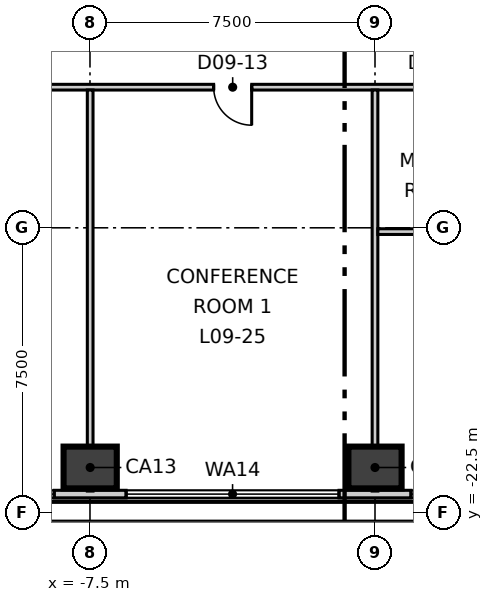
"""IFC4 building model, lengths in metres.
Left out: names, types, materials, properties, quantities, classifications, styles, units other than length and angle.
Written with IfcOpenShell. Run it as: python <this file> out.ifc"""

import sys

from ifc_helpers import new_model, si_unit, direction, frame, frame_2d, origin, origin_2d, place, context, subcontext, project, spatial, rectangle, extrude, element, fill, save


model = new_model("IFC4")
c1 = context("Model", 3, precision=1e-05, world=origin(), true_north=direction((0.0, 1.0)))
c2 = subcontext(c1, "Body", "Model", "MODEL_VIEW")
j1 = project(units=[si_unit("LENGTHUNIT", "METRE"), si_unit("PLANEANGLEUNIT", "RADIAN")], contexts=[c1])
p1 = place(None, origin())
s1 = spatial("IfcSite", under=j1, at=p1, CompositionType="ELEMENT")
p2 = place(p1, origin())
s2 = spatial("IfcBuilding", under=s1, at=p2, CompositionType="ELEMENT")
p3 = place(p2, frame((0.0, 0.0, 47.3)))
s3 = spatial("IfcBuildingStorey", under=s2, at=p3, CompositionType="ELEMENT", Elevation=47.3)
for number, where, z_axis, x_axis in (
    (1, (-7.495, -21.307, -0.3), (0.0, 0.0, 1.0), (1.0, 0.0, 0.0)),
    (2, (0.0, -21.307, -0.3), (0.0, 0.0, 1.0), (1.0, 0.0, 0.0)),
):
    element("IfcColumn", number, at=place(p3, frame(where, z_axis=z_axis, x_axis=x_axis)), inside=s3, PredefinedType="COLUMN", context=c2, shape_type="SweptSolid", body=[
        extrude(rectangle(XDim=1.4, YDim=1.1, at=origin_2d()), origin(), (0.0, 0.0, 1.0), 4.0),
    ])
p4 = place(p3, frame((-3.417, 38.096, 0.0), z_axis=(0.0, 0.0, 1.0), x_axis=(-0.500000412988, -0.866025165346, 0.0)))
e3 = element("IfcWall", 3, at=p4, inside=s3, PredefinedType="ELEMENTEDWALL", context=c2, shape_type="SweptSolid", body=[
    extrude(rectangle(XDim=62.548, YDim=0.2, at=frame_2d((31.274, 0.0))), origin(), (0.0, 0.0, 1.0), 3.7),
])
p5 = place(p4, frame((2.25, 0.0, 0.9)))
e4 = element("IfcOpeningElement", 4, at=p5, cuts=e3, PredefinedType="OPENING", context=c2, shape_type="SweptSolid", body=[
    extrude(rectangle(XDim=5.6, YDim=2.5, at=frame_2d((2.8, 1.25))), frame((0.0, 0.11, 0.0), z_axis=(0.0, -1.0, 0.0), x_axis=(1.0, 0.0, 0.0)), (0.0, 0.0, 1.0), 0.22),
])
p6 = place(p4, frame((9.745, 0.0, 0.9)))
e5 = element("IfcOpeningElement", 5, at=p6, cuts=e3, PredefinedType="OPENING", context=c2, shape_type="SweptSolid", body=[
    extrude(rectangle(XDim=5.6, YDim=2.5, at=frame_2d((2.8, 1.25))), frame((0.0, 0.11, 0.0), z_axis=(0.0, -1.0, 0.0), x_axis=(1.0, 0.0, 0.0)), (0.0, 0.0, 1.0), 0.22),
])
p7 = place(p4, frame((17.241, 0.0, 0.9)))
e6 = element("IfcOpeningElement", 6, at=p7, cuts=e3, PredefinedType="OPENING", context=c2, shape_type="SweptSolid", body=[
    extrude(rectangle(XDim=5.6, YDim=2.5, at=frame_2d((2.8, 1.25))), frame((0.0, 0.11, 0.0), z_axis=(0.0, -1.0, 0.0), x_axis=(1.0, 0.0, 0.0)), (0.0, 0.0, 1.0), 0.22),
])
p8 = place(p4, frame((24.736, 0.0, 0.9)))
e7 = element("IfcOpeningElement", 7, at=p8, cuts=e3, PredefinedType="OPENING", context=c2, shape_type="SweptSolid", body=[
    extrude(rectangle(XDim=5.6, YDim=2.5, at=frame_2d((2.8, 1.25))), frame((0.0, 0.11, 0.0), z_axis=(0.0, -1.0, 0.0), x_axis=(1.0, 0.0, 0.0)), (0.0, 0.0, 1.0), 0.22),
])
p9 = place(p4, frame((32.231, 0.0, 0.9)))
e8 = element("IfcOpeningElement", 8, at=p9, cuts=e3, PredefinedType="OPENING", context=c2, shape_type="SweptSolid", body=[
    extrude(rectangle(XDim=5.6, YDim=2.5, at=frame_2d((2.8, 1.25))), frame((0.0, 0.11, 0.0), z_axis=(0.0, -1.0, 0.0), x_axis=(1.0, 0.0, 0.0)), (0.0, 0.0, 1.0), 0.22),
])
p10 = place(p4, frame((39.727, 0.0, 0.9)))
e9 = element("IfcOpeningElement", 9, at=p10, cuts=e3, PredefinedType="OPENING", context=c2, shape_type="SweptSolid", body=[
    extrude(rectangle(XDim=5.6, YDim=2.5, at=frame_2d((2.8, 1.25))), frame((0.0, 0.11, 0.0), z_axis=(0.0, -1.0, 0.0), x_axis=(1.0, 0.0, 0.0)), (0.0, 0.0, 1.0), 0.22),
])
p11 = place(p4, frame((47.222, 0.0, 0.9)))
e10 = element("IfcOpeningElement", 10, at=p11, cuts=e3, PredefinedType="OPENING", context=c2, shape_type="SweptSolid", body=[
    extrude(rectangle(XDim=5.6, YDim=2.5, at=frame_2d((2.8, 1.25))), frame((0.0, 0.11, 0.0), z_axis=(0.0, -1.0, 0.0), x_axis=(1.0, 0.0, 0.0)), (0.0, 0.0, 1.0), 0.22),
])
p12 = place(p4, frame((54.717, 0.0, 0.9)))
e11 = element("IfcOpeningElement", 11, at=p12, cuts=e3, PredefinedType="OPENING", context=c2, shape_type="SweptSolid", body=[
    extrude(rectangle(XDim=5.6, YDim=2.5, at=frame_2d((2.8, 1.25))), frame((0.0, 0.11, 0.0), z_axis=(0.0, -1.0, 0.0), x_axis=(1.0, 0.0, 0.0)), (0.0, 0.0, 1.0), 0.22),
])
p13 = place(p3, frame((-31.284, -22.007, 0.0), z_axis=(0.0, 0.0, 1.0), x_axis=(1.0, 0.0, 0.0)))
e12 = element("IfcWall", 12, at=p13, inside=s3, PredefinedType="ELEMENTEDWALL", context=c2, shape_type="SweptSolid", body=[
    extrude(rectangle(XDim=62.548, YDim=0.2, at=frame_2d((31.274, 0.0))), origin(), (0.0, 0.0, 1.0), 3.7),
])
p14 = place(p13, frame((2.251, 0.0, 0.9)))
e13 = element("IfcOpeningElement", 13, at=p14, cuts=e12, PredefinedType="OPENING", context=c2, shape_type="SweptSolid", body=[
    extrude(rectangle(XDim=5.6, YDim=2.5, at=frame_2d((2.8, 1.25))), frame((0.0, 0.11, 0.0), z_axis=(0.0, -1.0, 0.0), x_axis=(1.0, 0.0, 0.0)), (0.0, 0.0, 1.0), 0.22),
])
p15 = place(p13, frame((9.746, 0.0, 0.9)))
e14 = element("IfcOpeningElement", 14, at=p15, cuts=e12, PredefinedType="OPENING", context=c2, shape_type="SweptSolid", body=[
    extrude(rectangle(XDim=5.6, YDim=2.5, at=frame_2d((2.8, 1.25))), frame((0.0, 0.11, 0.0), z_axis=(0.0, -1.0, 0.0), x_axis=(1.0, 0.0, 0.0)), (0.0, 0.0, 1.0), 0.22),
])
p16 = place(p13, frame((17.241, 0.0, 0.9)))
e15 = element("IfcOpeningElement", 15, at=p16, cuts=e12, PredefinedType="OPENING", context=c2, shape_type="SweptSolid", body=[
    extrude(rectangle(XDim=5.6, YDim=2.5, at=frame_2d((2.8, 1.25))), frame((0.0, 0.11, 0.0), z_axis=(0.0, -1.0, 0.0), x_axis=(1.0, 0.0, 0.0)), (0.0, 0.0, 1.0), 0.22),
])
p17 = place(p13, frame((24.736, 0.0, 0.9)))
e16 = element("IfcOpeningElement", 16, at=p17, cuts=e12, PredefinedType="OPENING", context=c2, shape_type="SweptSolid", body=[
    extrude(rectangle(XDim=5.6, YDim=2.5, at=frame_2d((2.8, 1.25))), frame((0.0, 0.11, 0.0), z_axis=(0.0, -1.0, 0.0), x_axis=(1.0, 0.0, 0.0)), (0.0, 0.0, 1.0), 0.22),
])
p18 = place(p13, frame((32.232, 0.0, 0.9)))
e17 = element("IfcOpeningElement", 17, at=p18, cuts=e12, PredefinedType="OPENING", context=c2, shape_type="SweptSolid", body=[
    extrude(rectangle(XDim=5.6, YDim=2.5, at=frame_2d((2.8, 1.25))), frame((0.0, 0.11, 0.0), z_axis=(0.0, -1.0, 0.0), x_axis=(1.0, 0.0, 0.0)), (0.0, 0.0, 1.0), 0.22),
])
p19 = place(p13, frame((39.727, 0.0, 0.9)))
e18 = element("IfcOpeningElement", 18, at=p19, cuts=e12, PredefinedType="OPENING", context=c2, shape_type="SweptSolid", body=[
    extrude(rectangle(XDim=5.6, YDim=2.5, at=frame_2d((2.8, 1.25))), frame((0.0, 0.11, 0.0), z_axis=(0.0, -1.0, 0.0), x_axis=(1.0, 0.0, 0.0)), (0.0, 0.0, 1.0), 0.22),
])
p20 = place(p13, frame((47.222, 0.0, 0.9)))
e19 = element("IfcOpeningElement", 19, at=p20, cuts=e12, PredefinedType="OPENING", context=c2, shape_type="SweptSolid", body=[
    extrude(rectangle(XDim=5.6, YDim=2.5, at=frame_2d((2.8, 1.25))), frame((0.0, 0.11, 0.0), z_axis=(0.0, -1.0, 0.0), x_axis=(1.0, 0.0, 0.0)), (0.0, 0.0, 1.0), 0.22),
])
p21 = place(p13, frame((54.717, 0.0, 0.9)))
e20 = element("IfcOpeningElement", 20, at=p21, cuts=e12, PredefinedType="OPENING", context=c2, shape_type="SweptSolid", body=[
    extrude(rectangle(XDim=5.6, YDim=2.5, at=frame_2d((2.8, 1.25))), frame((0.0, 0.11, 0.0), z_axis=(0.0, -1.0, 0.0), x_axis=(1.0, 0.0, 0.0)), (0.0, 0.0, 1.0), 0.22),
])
p22 = place(p3, frame((-19.497, -11.17, 0.0), z_axis=(0.0, 0.0, 1.0), x_axis=(0.499998854553, 0.866026065108, 0.0)))
e21 = element("IfcWall", 21, at=p22, inside=s3, PredefinedType="PARTITIONING", context=c2, shape_type="SweptSolid", body=[
    extrude(rectangle(XDim=38.994, YDim=0.15, at=frame_2d((19.497, 0.0))), origin(), (0.0, 0.0, 1.0), 3.7),
])
p23 = place(p22, frame((36.144, 0.0, 0.0)))
e22 = element("IfcOpeningElement", 22, at=p23, cuts=e21, PredefinedType="OPENING", context=c2, shape_type="SweptSolid", body=[
    extrude(rectangle(XDim=1.1, YDim=2.1, at=frame_2d((0.55, 1.05))), frame((0.0, 0.085, 0.0), z_axis=(0.0, -1.0, 0.0), x_axis=(1.0, 0.0, 0.0)), (0.0, 0.0, 1.0), 0.17),
])
p24 = place(p22, frame((21.963, 0.0, 0.0)))
e23 = element("IfcOpeningElement", 23, at=p24, cuts=e21, PredefinedType="OPENING", context=c2, shape_type="SweptSolid", body=[
    extrude(rectangle(XDim=1.1, YDim=2.1, at=frame_2d((0.55, 1.05))), frame((0.0, 0.085, 0.0), z_axis=(0.0, -1.0, 0.0), x_axis=(1.0, 0.0, 0.0)), (0.0, 0.0, 1.0), 0.17),
])
p25 = place(p22, frame((32.363, 0.0, 0.0)))
e24 = element("IfcOpeningElement", 24, at=p25, cuts=e21, PredefinedType="OPENING", context=c2, shape_type="SweptSolid", body=[
    extrude(rectangle(XDim=0.9, YDim=2.1, at=frame_2d((0.45, 1.05))), frame((0.0, 0.085, 0.0), z_axis=(0.0, -1.0, 0.0), x_axis=(1.0, 0.0, 0.0)), (0.0, 0.0, 1.0), 0.17),
])
p26 = place(p22, frame((29.163, 0.0, 0.0)))
e25 = element("IfcOpeningElement", 25, at=p26, cuts=e21, PredefinedType="OPENING", context=c2, shape_type="SweptSolid", body=[
    extrude(rectangle(XDim=0.9, YDim=2.1, at=frame_2d((0.45, 1.05))), frame((0.0, 0.085, 0.0), z_axis=(0.0, -1.0, 0.0), x_axis=(1.0, 0.0, 0.0)), (0.0, 0.0, 1.0), 0.17),
])
p27 = place(p22, frame((26.263, 0.0, 0.0)))
e26 = element("IfcOpeningElement", 26, at=p27, cuts=e21, PredefinedType="OPENING", context=c2, shape_type="SweptSolid", body=[
    extrude(rectangle(XDim=1.0, YDim=2.1, at=frame_2d((0.5, 1.05))), frame((0.0, 0.085, 0.0), z_axis=(0.0, -1.0, 0.0), x_axis=(1.0, 0.0, 0.0)), (0.0, 0.0, 1.0), 0.17),
])
p28 = place(p22, frame((11.373, 0.0, 0.0)))
e27 = element("IfcOpeningElement", 27, at=p28, cuts=e21, PredefinedType="OPENING", context=c2, shape_type="SweptSolid", body=[
    extrude(rectangle(XDim=1.1, YDim=2.1, at=frame_2d((0.55, 1.05))), frame((0.0, 0.085, 0.0), z_axis=(0.0, -1.0, 0.0), x_axis=(1.0, 0.0, 0.0)), (0.0, 0.0, 1.0), 0.17),
])
p29 = place(p22, frame((1.581, 0.0, 0.0)))
e28 = element("IfcOpeningElement", 28, at=p29, cuts=e21, PredefinedType="OPENING", context=c2, shape_type="SweptSolid", body=[
    extrude(rectangle(XDim=1.1, YDim=2.1, at=frame_2d((0.55, 1.05))), frame((0.0, 0.085, 0.0), z_axis=(0.0, -1.0, 0.0), x_axis=(1.0, 0.0, 0.0)), (0.0, 0.0, 1.0), 0.17),
])
p30 = place(p3, frame((-19.422, -11.3, 0.0), z_axis=(0.0, 0.0, 1.0), x_axis=(1.0, 0.0, 0.0)))
e29 = element("IfcWall", 29, at=p30, inside=s3, PredefinedType="PARTITIONING", context=c2, shape_type="SweptSolid", body=[
    extrude(rectangle(XDim=38.994, YDim=0.15, at=frame_2d((19.497, 0.0))), origin(), (0.0, 0.0, 1.0), 3.7),
])
p31 = place(p30, frame((1.6, 0.0, 0.0)))
e30 = element("IfcOpeningElement", 30, at=p31, cuts=e29, PredefinedType="OPENING", context=c2, shape_type="SweptSolid", body=[
    extrude(rectangle(XDim=1.1, YDim=2.1, at=frame_2d((0.55, 1.05))), frame((0.0, 0.085, 0.0), z_axis=(0.0, -1.0, 0.0), x_axis=(1.0, 0.0, 0.0)), (0.0, 0.0, 1.0), 0.17),
])
p32 = place(p30, frame((7.682, 0.0, 0.0)))
e31 = element("IfcOpeningElement", 31, at=p32, cuts=e29, PredefinedType="OPENING", context=c2, shape_type="SweptSolid", body=[
    extrude(rectangle(XDim=1.0, YDim=2.1, at=frame_2d((0.5, 1.05))), frame((0.0, 0.085, 0.0), z_axis=(0.0, -1.0, 0.0), x_axis=(1.0, 0.0, 0.0)), (0.0, 0.0, 1.0), 0.17),
])
p33 = place(p30, frame((15.177, 0.0, 0.0)))
e32 = element("IfcOpeningElement", 32, at=p33, cuts=e29, PredefinedType="OPENING", context=c2, shape_type="SweptSolid", body=[
    extrude(rectangle(XDim=1.0, YDim=2.1, at=frame_2d((0.5, 1.05))), frame((0.0, 0.085, 0.0), z_axis=(0.0, -1.0, 0.0), x_axis=(1.0, 0.0, 0.0)), (0.0, 0.0, 1.0), 0.17),
])
p34 = place(p30, frame((29.372, 0.0, 0.0)))
e33 = element("IfcOpeningElement", 33, at=p34, cuts=e29, PredefinedType="OPENING", context=c2, shape_type="SweptSolid", body=[
    extrude(rectangle(XDim=1.1, YDim=2.1, at=frame_2d((0.55, 1.05))), frame((0.0, 0.085, 0.0), z_axis=(0.0, -1.0, 0.0), x_axis=(1.0, 0.0, 0.0)), (0.0, 0.0, 1.0), 0.17),
])
p35 = place(p30, frame((20.772, 0.0, 0.0)))
e34 = element("IfcOpeningElement", 34, at=p35, cuts=e29, PredefinedType="OPENING", context=c2, shape_type="SweptSolid", body=[
    extrude(rectangle(XDim=0.9, YDim=2.1, at=frame_2d((0.45, 1.05))), frame((0.0, 0.085, 0.0), z_axis=(0.0, -1.0, 0.0), x_axis=(1.0, 0.0, 0.0)), (0.0, 0.0, 1.0), 0.17),
])
p36 = place(p30, frame((23.772, 0.0, 0.0)))
e35 = element("IfcOpeningElement", 35, at=p36, cuts=e29, PredefinedType="OPENING", context=c2, shape_type="SweptSolid", body=[
    extrude(rectangle(XDim=0.9, YDim=2.1, at=frame_2d((0.45, 1.05))), frame((0.0, 0.085, 0.0), z_axis=(0.0, -1.0, 0.0), x_axis=(1.0, 0.0, 0.0)), (0.0, 0.0, 1.0), 0.17),
])
p37 = place(p30, frame((36.163, 0.0, 0.0)))
e36 = element("IfcOpeningElement", 36, at=p37, cuts=e29, PredefinedType="OPENING", context=c2, shape_type="SweptSolid", body=[
    extrude(rectangle(XDim=1.1, YDim=2.1, at=frame_2d((0.55, 1.05))), frame((0.0, 0.085, 0.0), z_axis=(0.0, -1.0, 0.0), x_axis=(1.0, 0.0, 0.0)), (0.0, 0.0, 1.0), 0.17),
])
p38 = place(p3, frame((-7.495, -21.927, 0.0), z_axis=(0.0, 0.0, 1.0), x_axis=(0.0, 1.0, 0.0)))
e37 = element("IfcWall", 37, at=p38, inside=s3, PredefinedType="PARTITIONING", context=c2, shape_type="SweptSolid", body=[
    extrude(rectangle(XDim=10.552, YDim=0.15, at=frame_2d((5.276, 0.0))), origin(), (0.0, 0.0, 1.0), 3.7),
])
p39 = place(p3, frame((0.0, -21.927, 0.0), z_axis=(0.0, 0.0, 1.0), x_axis=(0.0, 1.0, 0.0)))
e38 = element("IfcWall", 38, at=p39, inside=s3, PredefinedType="PARTITIONING", context=c2, shape_type="SweptSolid", body=[
    extrude(rectangle(XDim=10.552, YDim=0.15, at=frame_2d((5.276, 0.0))), origin(), (0.0, 0.0, 1.0), 3.2),
])
p40 = place(p3, frame((0.075, -15.1, 0.0), z_axis=(0.0, 0.0, 1.0), x_axis=(1.0, 0.0, 0.0)))
e39 = element("IfcWall", 39, at=p40, inside=s3, PredefinedType="PARTITIONING", context=c2, shape_type="SweptSolid", body=[
    extrude(rectangle(XDim=3.525, YDim=0.15, at=frame_2d((1.763, 0.0))), origin(), (0.0, 0.0, 1.0), 3.7),
])
p41 = place(p3, frame((0.075, 22.47, 0.0), z_axis=(0.0, 0.0, 1.0), x_axis=(0.500002280369, -0.866024087209, 0.0)))
e40 = element("IfcWall", 40, at=p41, inside=s3, PredefinedType="PARTITIONING", context=c2, shape_type="SweptSolid", body=[
    extrude(rectangle(XDim=38.844, YDim=0.15, at=frame_2d((19.422, 0.0))), origin(), (0.0, 0.0, 1.0), 3.7),
])
p42 = place(p41, frame((36.244, 0.0, 0.0)))
e41 = element("IfcOpeningElement", 41, at=p42, cuts=e40, PredefinedType="OPENING", context=c2, shape_type="SweptSolid", body=[
    extrude(rectangle(XDim=1.0, YDim=2.1, at=frame_2d((0.5, 1.05))), frame((0.0, 0.085, 0.0), z_axis=(0.0, -1.0, 0.0), x_axis=(1.0, 0.0, 0.0)), (0.0, 0.0, 1.0), 0.17),
])
p43 = place(p41, frame((21.963, 0.0, 0.0)))
e42 = element("IfcOpeningElement", 42, at=p43, cuts=e40, PredefinedType="OPENING", context=c2, shape_type="SweptSolid", body=[
    extrude(rectangle(XDim=1.1, YDim=2.1, at=frame_2d((0.55, 1.05))), frame((0.0, 0.085, 0.0), z_axis=(0.0, -1.0, 0.0), x_axis=(1.0, 0.0, 0.0)), (0.0, 0.0, 1.0), 0.17),
])
p44 = place(p41, frame((32.363, 0.0, 0.0)))
e43 = element("IfcOpeningElement", 43, at=p44, cuts=e40, PredefinedType="OPENING", context=c2, shape_type="SweptSolid", body=[
    extrude(rectangle(XDim=0.9, YDim=2.1, at=frame_2d((0.45, 1.05))), frame((0.0, 0.085, 0.0), z_axis=(0.0, -1.0, 0.0), x_axis=(1.0, 0.0, 0.0)), (0.0, 0.0, 1.0), 0.17),
])
p45 = place(p41, frame((29.163, 0.0, 0.0)))
e44 = element("IfcOpeningElement", 44, at=p45, cuts=e40, PredefinedType="OPENING", context=c2, shape_type="SweptSolid", body=[
    extrude(rectangle(XDim=0.9, YDim=2.1, at=frame_2d((0.45, 1.05))), frame((0.0, 0.085, 0.0), z_axis=(0.0, -1.0, 0.0), x_axis=(1.0, 0.0, 0.0)), (0.0, 0.0, 1.0), 0.17),
])
p46 = place(p41, frame((26.263, 0.0, 0.0)))
e45 = element("IfcOpeningElement", 45, at=p46, cuts=e40, PredefinedType="OPENING", context=c2, shape_type="SweptSolid", body=[
    extrude(rectangle(XDim=1.0, YDim=2.1, at=frame_2d((0.5, 1.05))), frame((0.0, 0.085, 0.0), z_axis=(0.0, -1.0, 0.0), x_axis=(1.0, 0.0, 0.0)), (0.0, 0.0, 1.0), 0.17),
])
p47 = place(p41, frame((9.071, 0.0, 0.0)))
e46 = element("IfcOpeningElement", 46, at=p47, cuts=e40, PredefinedType="OPENING", context=c2, shape_type="SweptSolid", body=[
    extrude(rectangle(XDim=1.1, YDim=2.1, at=frame_2d((0.55, 1.05))), frame((0.0, 0.085, 0.0), z_axis=(0.0, -1.0, 0.0), x_axis=(1.0, 0.0, 0.0)), (0.0, 0.0, 1.0), 0.17),
])
p48 = place(p16, origin())
e47 = element("IfcWindow", 47, at=p48, inside=s3, PartitioningType="SINGLE_PANEL", PredefinedType="WINDOW", context=c2, shape_type="SweptSolid", body=[
    extrude(rectangle(XDim=5.6, YDim=2.5, at=frame_2d((2.8, 1.25))), frame((0.0, 0.03, 0.0), z_axis=(0.0, -1.0, 0.0), x_axis=(1.0, 0.0, 0.0)), (0.0, 0.0, 1.0), 0.06),
])
fill(e15, e47)
p49 = place(p17, origin())
e48 = element("IfcWindow", 48, at=p49, inside=s3, PartitioningType="SINGLE_PANEL", PredefinedType="WINDOW", context=c2, shape_type="SweptSolid", body=[
    extrude(rectangle(XDim=5.6, YDim=2.5, at=frame_2d((2.8, 1.25))), frame((0.0, 0.03, 0.0), z_axis=(0.0, -1.0, 0.0), x_axis=(1.0, 0.0, 0.0)), (0.0, 0.0, 1.0), 0.06),
])
fill(e16, e48)
p50 = place(p18, origin())
e49 = element("IfcWindow", 49, at=p50, inside=s3, PartitioningType="SINGLE_PANEL", PredefinedType="WINDOW", context=c2, shape_type="SweptSolid", body=[
    extrude(rectangle(XDim=5.6, YDim=2.5, at=frame_2d((2.8, 1.25))), frame((0.0, 0.03, 0.0), z_axis=(0.0, -1.0, 0.0), x_axis=(1.0, 0.0, 0.0)), (0.0, 0.0, 1.0), 0.06),
])
fill(e17, e49)
p51 = place(p33, origin())
e50 = element("IfcDoor", 50, at=p51, inside=s3, OperationType="SINGLE_SWING_RIGHT", PredefinedType="DOOR", context=c2, shape_type="SweptSolid", body=[
    extrude(rectangle(XDim=1.0, YDim=2.1, at=frame_2d((0.5, 1.05))), frame((0.0, 0.025, 0.0), z_axis=(0.0, -1.0, 0.0), x_axis=(1.0, 0.0, 0.0)), (0.0, 0.0, 1.0), 0.05),
])
fill(e32, e50)
save(model, sys.argv[1])
